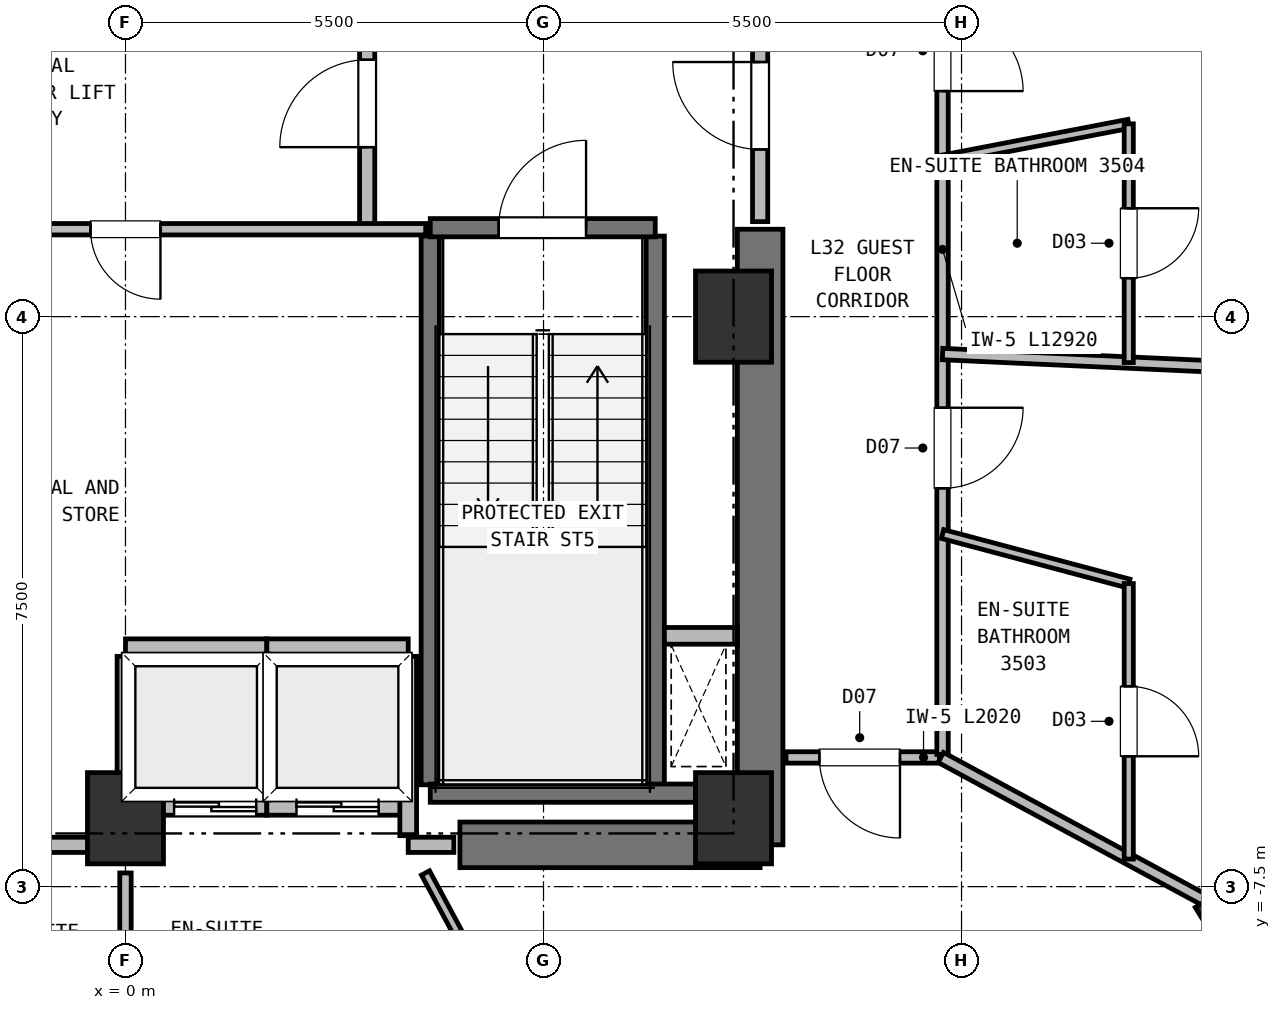
"""IFC4 building model, lengths in metres.
Left out: names, types, materials, properties, quantities, classifications, styles, units other than length and angle.
Written with IfcOpenShell. Run it as: python <this file> out.ifc"""

import sys

from ifc_helpers import new_model, si_unit, direction, frame, frame_2d, origin, origin_2d, place, context, subcontext, project, spatial, rectangle, extrude, element, fill, save


model = new_model("IFC4")
c1 = context("Model", 3, precision=1e-05, world=origin(), true_north=direction((0.0, 1.0)))
c2 = subcontext(c1, "Body", "Model", "MODEL_VIEW")
j1 = project(units=[si_unit("LENGTHUNIT", "METRE"), si_unit("PLANEANGLEUNIT", "RADIAN")], contexts=[c1])
p1 = place(None, origin())
s1 = spatial("IfcSite", under=j1, at=p1, CompositionType="ELEMENT")
p2 = place(p1, origin())
s2 = spatial("IfcBuilding", under=s1, at=p2, CompositionType="ELEMENT")
p3 = place(p2, frame((0.0, 0.0, 131.0)))
s3 = spatial("IfcBuildingStorey", under=s2, at=p3, CompositionType="ELEMENT", Elevation=131.0)
for number, where, z_axis, x_axis in (
    (1, (0.0, -6.6, 0.0), (0.0, 0.0, 1.0), (1.0, 0.0, 0.0)),
    (2, (8.0, -6.6, 0.0), (0.0, 0.0, 1.0), (1.0, 0.0, 0.0)),
    (3, (8.0, 0.0, 0.0), (0.0, 0.0, 1.0), (1.0, 0.0, 0.0)),
):
    element("IfcColumn", number, at=place(p3, frame(where, z_axis=z_axis, x_axis=x_axis)), inside=s3, PredefinedType="COLUMN", context=c2, shape_type="SweptSolid", body=[
        extrude(rectangle(XDim=1.0, YDim=1.2, at=origin_2d()), origin(), (0.0, 0.0, 1.0), 3.75),
    ])
p4 = place(p3, frame((4.4, -6.95, 0.0), z_axis=(0.0, 0.0, 1.0), x_axis=(1.0, 0.0, 0.0)))
e4 = element("IfcWall", 4, at=p4, inside=s3, PredefinedType="SHEAR", context=c2, shape_type="SweptSolid", body=[
    extrude(rectangle(XDim=3.95, YDim=0.6, at=frame_2d((1.975, 0.0))), origin(), (0.0, 0.0, 1.0), 3.5),
])
p5 = place(p3, frame((8.35, -6.95, 0.0), z_axis=(0.0, 0.0, 1.0), x_axis=(0.0, 1.0, 0.0)))
e5 = element("IfcWall", 5, at=p5, inside=s3, PredefinedType="SHEAR", context=c2, shape_type="SweptSolid", body=[
    extrude(rectangle(XDim=8.1, YDim=0.6, at=frame_2d((4.05, 0.0))), origin(), (0.0, 0.0, 1.0), 3.5),
])
p6 = place(p3, frame((14.747, -8.007, 0.0), z_axis=(0.0, 0.0, 1.0), x_axis=(0.852640164354, 0.522498564716, 0.0)))
e6 = element("IfcColumn", 6, at=p6, inside=s3, PredefinedType="COLUMN", context=c2, shape_type="SweptSolid", body=[
    extrude(rectangle(XDim=0.9, YDim=1.1, at=origin_2d()), origin(), (0.0, 0.0, 1.0), 3.75),
])
for number, where, z_axis, x_axis in (
    (7, (4.01, -6.16, 0.0), (0.0, 0.0, 1.0), (0.0, 1.0, 0.0)),
    (8, (6.97, -6.16, 0.0), (0.0, 0.0, 1.0), (0.0, 1.0, 0.0)),
):
    element("IfcWall", number, at=place(p3, frame(where, z_axis=z_axis, x_axis=x_axis)), inside=s3, PredefinedType="SHEAR", context=c2, shape_type="SweptSolid", body=[
        extrude(rectangle(XDim=7.22, YDim=0.24, at=frame_2d((3.61, 0.0))), origin(), (0.0, 0.0, 1.0), 3.5),
    ])
p7 = place(p3, frame((4.01, -6.27, 0.0), z_axis=(0.0, 0.0, 1.0), x_axis=(1.0, 0.0, 0.0)))
e9 = element("IfcWall", 9, at=p7, inside=s3, PredefinedType="SHEAR", context=c2, shape_type="SweptSolid", body=[
    extrude(rectangle(XDim=3.49, YDim=0.24, at=frame_2d((1.745, 0.0))), origin(), (0.0, 0.0, 1.0), 3.5),
])
p8 = place(p3, frame((4.01, 1.17, 0.0), z_axis=(0.0, 0.0, 1.0), x_axis=(1.0, 0.0, 0.0)))
e10 = element("IfcWall", 10, at=p8, inside=s3, PredefinedType="SHEAR", context=c2, shape_type="SweptSolid", body=[
    extrude(rectangle(XDim=2.96, YDim=0.24, at=frame_2d((1.48, 0.0))), origin(), (0.0, 0.0, 1.0), 3.5),
])
p9 = place(p8, frame((0.9, 0.0, 0.0)))
e11 = element("IfcOpeningElement", 11, at=p9, cuts=e10, PredefinedType="OPENING", context=c2, shape_type="SweptSolid", body=[
    extrude(rectangle(XDim=1.15, YDim=2.15, at=frame_2d((0.575, 1.075))), frame((0.0, 0.13, 0.0), z_axis=(0.0, -1.0, 0.0), x_axis=(1.0, 0.0, 0.0)), (0.0, 0.0, 1.0), 0.26),
])
p10 = place(p3, frame((7.09, -4.2, 0.0), z_axis=(0.0, 0.0, 1.0), x_axis=(1.0, 0.0, 0.0)))
e12 = element("IfcWall", 12, at=p10, inside=s3, PredefinedType="PARTITIONING", context=c2, shape_type="SweptSolid", body=[
    extrude(rectangle(XDim=0.96, YDim=0.22, at=frame_2d((0.48, 0.0))), origin(), (0.0, 0.0, 1.0), 3.5),
])
p11 = place(p3, frame((0.0, -6.45, 0.0), z_axis=(0.0, 0.0, 1.0), x_axis=(1.0, 0.0, 0.0)))
e13 = element("IfcWall", 13, at=p11, inside=s3, PredefinedType="PARTITIONING", context=c2, shape_type="SweptSolid", body=[
    extrude(rectangle(XDim=1.86, YDim=0.22, at=frame_2d((0.93, 0.0))), origin(), (0.0, 0.0, 1.0), 3.12),
])
p12 = place(p11, frame((0.64, 0.0, 0.0)))
e14 = element("IfcOpeningElement", 14, at=p12, cuts=e13, PredefinedType="OPENING", context=c2, shape_type="SweptSolid", body=[
    extrude(rectangle(XDim=1.08, YDim=2.15, at=frame_2d((0.54, 1.075))), frame((0.0, 0.12, 0.0), z_axis=(0.0, -1.0, 0.0), x_axis=(1.0, 0.0, 0.0)), (0.0, 0.0, 1.0), 0.24),
])
for number, where, z_axis, x_axis in (
    (15, (0.0, -4.35, 0.0), (0.0, 0.0, 1.0), (1.0, 0.0, 0.0)),
    (16, (0.0, -6.33, 0.0), (0.0, 0.0, 1.0), (0.0, 1.0, 0.0)),
    (17, (1.86, -6.33, 0.0), (0.0, 0.0, 1.0), (0.0, 1.0, 0.0)),
):
    element("IfcWall", number, at=place(p3, frame(where, z_axis=z_axis, x_axis=x_axis)), inside=s3, PredefinedType="PARTITIONING", context=c2, shape_type="SweptSolid", body=[
        extrude(rectangle(XDim=1.86, YDim=0.22, at=frame_2d((0.93, 0.0))), origin(), (0.0, 0.0, 1.0), 3.5),
    ])
p13 = place(p3, frame((1.86, -6.45, 0.0), z_axis=(0.0, 0.0, 1.0), x_axis=(1.0, 0.0, 0.0)))
e18 = element("IfcWall", 18, at=p13, inside=s3, PredefinedType="PARTITIONING", context=c2, shape_type="SweptSolid", body=[
    extrude(rectangle(XDim=1.86, YDim=0.22, at=frame_2d((0.93, 0.0))), origin(), (0.0, 0.0, 1.0), 3.12),
])
p14 = place(p13, frame((0.39, 0.0, 0.0)))
e19 = element("IfcOpeningElement", 19, at=p14, cuts=e18, PredefinedType="OPENING", context=c2, shape_type="SweptSolid", body=[
    extrude(rectangle(XDim=1.08, YDim=2.15, at=frame_2d((0.54, 1.075))), frame((0.0, 0.12, 0.0), z_axis=(0.0, -1.0, 0.0), x_axis=(1.0, 0.0, 0.0)), (0.0, 0.0, 1.0), 0.24),
])
p15 = place(p3, frame((1.86, -4.35, 0.0), z_axis=(0.0, 0.0, 1.0), x_axis=(1.0, 0.0, 0.0)))
e20 = element("IfcWall", 20, at=p15, inside=s3, PredefinedType="PARTITIONING", context=c2, shape_type="SweptSolid", body=[
    extrude(rectangle(XDim=1.86, YDim=0.22, at=frame_2d((0.93, 0.0))), origin(), (0.0, 0.0, 1.0), 3.5),
])
p16 = place(p3, frame((3.72, -6.83, 0.0), z_axis=(0.0, 0.0, 1.0), x_axis=(0.0, 1.0, 0.0)))
e21 = element("IfcWall", 21, at=p16, inside=s3, PredefinedType="PARTITIONING", context=c2, shape_type="SweptSolid", body=[
    extrude(rectangle(XDim=2.36, YDim=0.22, at=frame_2d((1.18, 0.0))), origin(), (0.0, 0.0, 1.0), 3.5),
])
p17 = place(p3, frame((3.18, 1.15, 0.0), z_axis=(0.0, 0.0, 1.0), x_axis=(0.0, 1.0, 0.0)))
e22 = element("IfcWall", 22, at=p17, inside=s3, PredefinedType="PARTITIONING", context=c2, shape_type="SweptSolid", body=[
    extrude(rectangle(XDim=3.3, YDim=0.2, at=frame_2d((1.65, 0.0))), origin(), (0.0, 0.0, 1.0), 3.5),
])
p18 = place(p17, frame((1.08, 0.0, 0.0)))
e23 = element("IfcOpeningElement", 23, at=p18, cuts=e22, PredefinedType="OPENING", context=c2, shape_type="SweptSolid", body=[
    extrude(rectangle(XDim=1.15, YDim=2.15, at=frame_2d((0.575, 1.075))), frame((0.0, 0.11, 0.0), z_axis=(0.0, -1.0, 0.0), x_axis=(1.0, 0.0, 0.0)), (0.0, 0.0, 1.0), 0.22),
])
p19 = place(p3, frame((8.35, 1.25, 0.0), z_axis=(0.0, 0.0, 1.0), x_axis=(0.0, 1.0, 0.0)))
e24 = element("IfcWall", 24, at=p19, inside=s3, PredefinedType="PARTITIONING", context=c2, shape_type="SweptSolid", body=[
    extrude(rectangle(XDim=5.3, YDim=0.2, at=frame_2d((2.65, 0.0))), origin(), (0.0, 0.0, 1.0), 3.5),
])
p20 = place(p19, frame((0.95, 0.0, 0.0)))
e25 = element("IfcOpeningElement", 25, at=p20, cuts=e24, PredefinedType="OPENING", context=c2, shape_type="SweptSolid", body=[
    extrude(rectangle(XDim=1.15, YDim=2.15, at=frame_2d((0.575, 1.075))), frame((0.0, 0.11, 0.0), z_axis=(0.0, -1.0, 0.0), x_axis=(1.0, 0.0, 0.0)), (0.0, 0.0, 1.0), 0.22),
])
p21 = place(p3, frame((3.95, 1.15, 0.0), z_axis=(0.0, 0.0, 1.0), x_axis=(-1.0, 0.0, 0.0)))
e26 = element("IfcWall", 26, at=p21, inside=s3, PredefinedType="PARTITIONING", context=c2, shape_type="SweptSolid", body=[
    extrude(rectangle(XDim=7.9, YDim=0.15, at=frame_2d((3.95, 0.0))), origin(), (0.0, 0.0, 1.0), 3.5),
])
p22 = place(p21, frame((3.49, 0.0, 0.0)))
e27 = element("IfcOpeningElement", 27, at=p22, cuts=e26, PredefinedType="OPENING", context=c2, shape_type="SweptSolid", body=[
    extrude(rectangle(XDim=0.92, YDim=2.05, at=frame_2d((0.46, 1.025))), frame((0.0, 0.085, 0.0), z_axis=(0.0, -1.0, 0.0), x_axis=(1.0, 0.0, 0.0)), (0.0, 0.0, 1.0), 0.17),
])
p23 = place(p3, frame((-4.32, -6.95, 0.0), z_axis=(0.0, 0.0, 1.0), x_axis=(1.0, 0.0, 0.0)))
e28 = element("IfcWall", 28, at=p23, inside=s3, PredefinedType="PARTITIONING", context=c2, shape_type="SweptSolid", body=[
    extrude(rectangle(XDim=4.32, YDim=0.2, at=frame_2d((2.16, 0.0))), origin(), (0.0, 0.0, 1.0), 3.5),
])
p24 = place(p3, frame((3.72, -6.95, 0.0), z_axis=(0.0, 0.0, 1.0), x_axis=(1.0, 0.0, 0.0)))
e29 = element("IfcWall", 29, at=p24, inside=s3, PredefinedType="PARTITIONING", context=c2, shape_type="SweptSolid", body=[
    extrude(rectangle(XDim=0.6, YDim=0.2, at=frame_2d((0.3, 0.0))), origin(), (0.0, 0.0, 1.0), 3.5),
])
p25 = place(p3, frame((10.71, -5.8, 0.0), z_axis=(0.0, 0.0, 1.0), x_axis=(-1.0, 0.0, 0.0)))
e30 = element("IfcWall", 30, at=p25, inside=s3, PredefinedType="PARTITIONING", context=c2, shape_type="SweptSolid", body=[
    extrude(rectangle(XDim=2.02, YDim=0.15, at=frame_2d((1.01, 0.0))), origin(), (0.0, 0.0, 1.0), 3.5),
])
p26 = place(p25, frame((0.52, 0.0, 0.0)))
e31 = element("IfcOpeningElement", 31, at=p26, cuts=e30, PredefinedType="OPENING", context=c2, shape_type="SweptSolid", body=[
    extrude(rectangle(XDim=1.06, YDim=2.15, at=frame_2d((0.53, 1.075))), frame((0.0, 0.085, 0.0), z_axis=(0.0, -1.0, 0.0), x_axis=(1.0, 0.0, 0.0)), (0.0, 0.0, 1.0), 0.17),
])
p27 = place(p3, frame((10.75, 7.16, 0.0), z_axis=(0.0, 0.0, 1.0), x_axis=(0.0, -1.0, 0.0)))
e32 = element("IfcWall", 32, at=p27, inside=s3, PredefinedType="PARTITIONING", context=c2, shape_type="SweptSolid", body=[
    extrude(rectangle(XDim=12.92, YDim=0.15, at=frame_2d((6.46, 0.0))), origin(), (0.0, 0.0, 1.0), 3.5),
])
p28 = place(p27, frame((8.359, 0.0, 0.0)))
e33 = element("IfcOpeningElement", 33, at=p28, cuts=e32, PredefinedType="OPENING", context=c2, shape_type="SweptSolid", body=[
    extrude(rectangle(XDim=1.06, YDim=2.15, at=frame_2d((0.53, 1.075))), frame((0.0, 0.085, 0.0), z_axis=(0.0, -1.0, 0.0), x_axis=(1.0, 0.0, 0.0)), (0.0, 0.0, 1.0), 0.17),
])
p29 = place(p27, frame((3.132, 0.0, 0.0)))
e34 = element("IfcOpeningElement", 34, at=p29, cuts=e32, PredefinedType="OPENING", context=c2, shape_type="SweptSolid", body=[
    extrude(rectangle(XDim=1.06, YDim=2.15, at=frame_2d((0.53, 1.075))), frame((0.0, 0.085, 0.0), z_axis=(0.0, -1.0, 0.0), x_axis=(1.0, 0.0, 0.0)), (0.0, 0.0, 1.0), 0.17),
])
p30 = place(p3, frame((0.0, -7.32, 0.0), z_axis=(0.0, 0.0, 1.0), x_axis=(0.0, -1.0, 0.0)))
e35 = element("IfcWall", 35, at=p30, inside=s3, PredefinedType="PARTITIONING", context=c2, shape_type="SweptSolid", body=[
    extrude(rectangle(XDim=11.722, YDim=0.15, at=frame_2d((5.861, 0.0))), origin(), (0.0, 0.0, 1.0), 3.5),
])
p31 = place(p3, frame((3.947, -7.32, 0.0), z_axis=(0.0, 0.0, 1.0), x_axis=(0.474665085806, -0.880166493521, 0.0)))
e36 = element("IfcWall", 36, at=p31, inside=s3, PredefinedType="PARTITIONING", context=c2, shape_type="SweptSolid", body=[
    extrude(rectangle(XDim=2.704, YDim=0.12, at=frame_2d((1.352, 0.0))), origin(), (0.0, 0.0, 1.0), 3.5),
])
p32 = place(p3, frame((10.727, -5.8, 0.0), z_axis=(0.0, 0.0, 1.0), x_axis=(0.879646503143, -0.475628036924, 0.0)))
e37 = element("IfcWall", 37, at=p32, inside=s3, PredefinedType="PARTITIONING", context=c2, shape_type="SweptSolid", body=[
    extrude(rectangle(XDim=6.256, YDim=0.15, at=frame_2d((3.128, 0.0))), origin(), (0.0, 0.0, 1.0), 2.98),
])
p33 = place(p3, frame((10.75, -2.86, 0.0), z_axis=(0.0, 0.0, 1.0), x_axis=(0.966378640851, -0.257123166026, 0.0)))
e38 = element("IfcWall", 38, at=p33, inside=s3, PredefinedType="PARTITIONING", context=c2, shape_type="SweptSolid", body=[
    extrude(rectangle(XDim=2.535, YDim=0.12, at=frame_2d((1.268, 0.0))), origin(), (0.0, 0.0, 1.0), 3.5),
])
p34 = place(p3, frame((13.2, -3.512, 0.0), z_axis=(0.0, 0.0, 1.0), x_axis=(0.0, -1.0, 0.0)))
e39 = element("IfcWall", 39, at=p34, inside=s3, PredefinedType="PARTITIONING", context=c2, shape_type="SweptSolid", body=[
    extrude(rectangle(XDim=3.625, YDim=0.12, at=frame_2d((1.812, 0.0))), origin(), (0.0, 0.0, 1.0), 3.5),
])
p35 = place(p34, frame((1.353, 0.0, 0.0)))
e40 = element("IfcOpeningElement", 40, at=p35, cuts=e39, PredefinedType="OPENING", context=c2, shape_type="SweptSolid", body=[
    extrude(rectangle(XDim=0.92, YDim=2.1, at=frame_2d((0.46, 1.05))), frame((0.0, 0.07, 0.0), z_axis=(0.0, -1.0, 0.0), x_axis=(1.0, 0.0, 0.0)), (0.0, 0.0, 1.0), 0.14),
])
p36 = place(p3, frame((10.75, -0.492, 0.0), z_axis=(0.0, 0.0, 1.0), x_axis=(0.998952227347, -0.045765133883, 0.0)))
e41 = element("IfcWall", 41, at=p36, inside=s3, PredefinedType="PARTITIONING", context=c2, shape_type="SweptSolid", body=[
    extrude(rectangle(XDim=12.856, YDim=0.15, at=frame_2d((6.428, 0.0))), origin(), (0.0, 0.0, 1.0), 3.5),
])
p37 = place(p3, frame((13.2, 2.537, 0.0), z_axis=(0.0, 0.0, 1.0), x_axis=(-0.982039238769, -0.188676796447, 0.0)))
e42 = element("IfcWall", 42, at=p37, inside=s3, PredefinedType="PARTITIONING", context=c2, shape_type="SweptSolid", body=[
    extrude(rectangle(XDim=2.495, YDim=0.12, at=frame_2d((1.248, 0.0))), origin(), (0.0, 0.0, 1.0), 3.5),
])
p38 = place(p3, frame((13.2, 2.537, 0.0), z_axis=(0.0, 0.0, 1.0), x_axis=(0.0, -1.0, 0.0)))
e43 = element("IfcWall", 43, at=p38, inside=s3, PredefinedType="PARTITIONING", context=c2, shape_type="SweptSolid", body=[
    extrude(rectangle(XDim=3.141, YDim=0.12, at=frame_2d((1.571, 0.0))), origin(), (0.0, 0.0, 1.0), 3.5),
])
p39 = place(p38, frame((1.111, 0.0, 0.0)))
e44 = element("IfcOpeningElement", 44, at=p39, cuts=e43, PredefinedType="OPENING", context=c2, shape_type="SweptSolid", body=[
    extrude(rectangle(XDim=0.92, YDim=2.1, at=frame_2d((0.46, 1.05))), frame((0.0, 0.07, 0.0), z_axis=(0.0, -1.0, 0.0), x_axis=(1.0, 0.0, 0.0)), (0.0, 0.0, 1.0), 0.14),
])
p40 = place(p9, origin())
e45 = element("IfcDoor", 45, at=p40, inside=s3, OperationType="SINGLE_SWING_RIGHT", PredefinedType="DOOR", context=c2, shape_type="SweptSolid", body=[
    extrude(rectangle(XDim=1.15, YDim=2.15, at=frame_2d((0.575, 1.075))), frame((0.0, 0.025, 0.0), z_axis=(0.0, -1.0, 0.0), x_axis=(1.0, 0.0, 0.0)), (0.0, 0.0, 1.0), 0.05),
])
fill(e11, e45)
p41 = place(p12, origin())
e46 = element("IfcDoor", 46, at=p41, inside=s3, OperationType="DOUBLE_DOOR_SLIDING", PredefinedType="DOOR", context=c2, shape_type="SweptSolid", body=[
    extrude(rectangle(XDim=1.08, YDim=2.15, at=frame_2d((0.54, 1.075))), frame((0.0, 0.025, 0.0), z_axis=(0.0, -1.0, 0.0), x_axis=(1.0, 0.0, 0.0)), (0.0, 0.0, 1.0), 0.05),
])
fill(e14, e46)
p42 = place(p14, origin())
e47 = element("IfcDoor", 47, at=p42, inside=s3, OperationType="DOUBLE_DOOR_SLIDING", PredefinedType="DOOR", context=c2, shape_type="SweptSolid", body=[
    extrude(rectangle(XDim=1.08, YDim=2.15, at=frame_2d((0.54, 1.075))), frame((0.0, 0.025, 0.0), z_axis=(0.0, -1.0, 0.0), x_axis=(1.0, 0.0, 0.0)), (0.0, 0.0, 1.0), 0.05),
])
fill(e19, e47)
p43 = place(p18, origin())
e48 = element("IfcDoor", 48, at=p43, inside=s3, OperationType="SINGLE_SWING_LEFT", PredefinedType="DOOR", context=c2, shape_type="SweptSolid", body=[
    extrude(rectangle(XDim=1.15, YDim=2.15, at=frame_2d((0.575, 1.075))), frame((0.0, 0.025, 0.0), z_axis=(0.0, -1.0, 0.0), x_axis=(1.0, 0.0, 0.0)), (0.0, 0.0, 1.0), 0.05),
])
fill(e23, e48)
p44 = place(p20, origin())
e49 = element("IfcDoor", 49, at=p44, inside=s3, OperationType="SINGLE_SWING_RIGHT", PredefinedType="DOOR", context=c2, shape_type="SweptSolid", body=[
    extrude(rectangle(XDim=1.15, YDim=2.15, at=frame_2d((0.575, 1.075))), frame((0.0, 0.025, 0.0), z_axis=(0.0, -1.0, 0.0), x_axis=(1.0, 0.0, 0.0)), (0.0, 0.0, 1.0), 0.05),
])
fill(e25, e49)
p45 = place(p22, origin())
e50 = element("IfcDoor", 50, at=p45, inside=s3, OperationType="SINGLE_SWING_LEFT", PredefinedType="DOOR", context=c2, shape_type="SweptSolid", body=[
    extrude(rectangle(XDim=0.92, YDim=2.05, at=frame_2d((0.46, 1.025))), frame((0.0, 0.025, 0.0), z_axis=(0.0, -1.0, 0.0), x_axis=(1.0, 0.0, 0.0)), (0.0, 0.0, 1.0), 0.05),
])
fill(e27, e50)
p46 = place(p35, origin())
e51 = element("IfcDoor", 51, at=p46, inside=s3, OperationType="SINGLE_SWING_RIGHT", PredefinedType="DOOR", context=c2, shape_type="SweptSolid", body=[
    extrude(rectangle(XDim=0.92, YDim=2.1, at=frame_2d((0.46, 1.05))), frame((0.0, 0.025, 0.0), z_axis=(0.0, -1.0, 0.0), x_axis=(1.0, 0.0, 0.0)), (0.0, 0.0, 1.0), 0.05),
])
fill(e40, e51)
p47 = place(p39, origin())
e52 = element("IfcDoor", 52, at=p47, inside=s3, OperationType="SINGLE_SWING_LEFT", PredefinedType="DOOR", context=c2, shape_type="SweptSolid", body=[
    extrude(rectangle(XDim=0.92, YDim=2.1, at=frame_2d((0.46, 1.05))), frame((0.0, 0.025, 0.0), z_axis=(0.0, -1.0, 0.0), x_axis=(1.0, 0.0, 0.0)), (0.0, 0.0, 1.0), 0.05),
])
fill(e44, e52)
p48 = place(p28, origin())
e53 = element("IfcDoor", 53, at=p48, inside=s3, OperationType="SINGLE_SWING_LEFT", PredefinedType="DOOR", context=c2, shape_type="SweptSolid", body=[
    extrude(rectangle(XDim=1.06, YDim=2.15, at=frame_2d((0.53, 1.075))), frame((0.0, 0.025, 0.0), z_axis=(0.0, -1.0, 0.0), x_axis=(1.0, 0.0, 0.0)), (0.0, 0.0, 1.0), 0.05),
])
fill(e33, e53)
p49 = place(p29, origin())
e54 = element("IfcDoor", 54, at=p49, inside=s3, OperationType="SINGLE_SWING_RIGHT", PredefinedType="DOOR", context=c2, shape_type="SweptSolid", body=[
    extrude(rectangle(XDim=1.06, YDim=2.15, at=frame_2d((0.53, 1.075))), frame((0.0, 0.025, 0.0), z_axis=(0.0, -1.0, 0.0), x_axis=(1.0, 0.0, 0.0)), (0.0, 0.0, 1.0), 0.05),
])
fill(e34, e54)
p50 = place(p26, origin())
e55 = element("IfcDoor", 55, at=p50, inside=s3, OperationType="SINGLE_SWING_LEFT", PredefinedType="DOOR", context=c2, shape_type="SweptSolid", body=[
    extrude(rectangle(XDim=1.06, YDim=2.15, at=frame_2d((0.53, 1.075))), frame((0.0, 0.025, 0.0), z_axis=(0.0, -1.0, 0.0), x_axis=(1.0, 0.0, 0.0)), (0.0, 0.0, 1.0), 0.05),
])
fill(e31, e55)
save(model, sys.argv[1])
